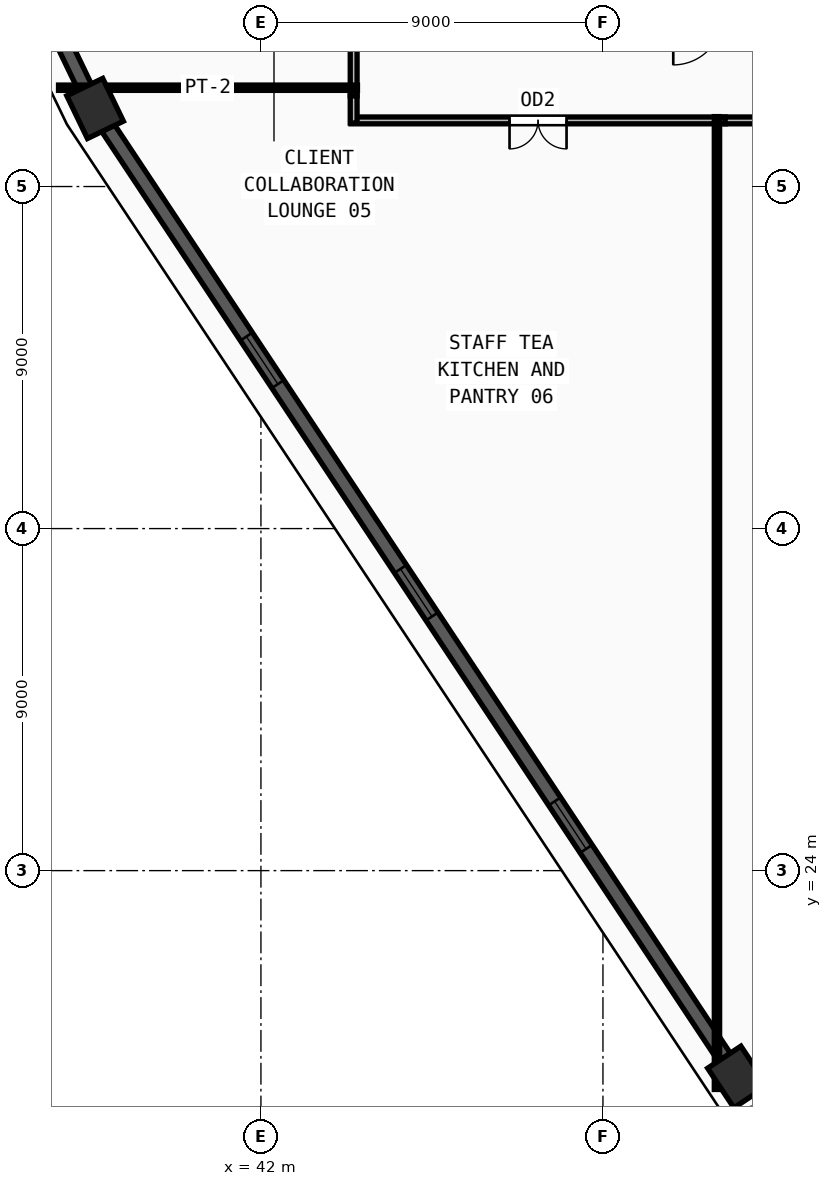
"""IFC4 building model, lengths in metres.
Left out: names, types, materials, properties, quantities, classifications, styles, units other than length and angle.
Written with IfcOpenShell. Run it as: python <this file> out.ifc"""

import sys

from ifc_helpers import new_model, si_unit, direction, frame, frame_2d, origin, origin_2d, place, context, subcontext, project, spatial, rectangle, extrude, source, transform, mapped, element, fill, save


model = new_model("IFC4")
c1 = context("Model", 3, precision=1e-05, world=origin(), true_north=direction((0.0, 1.0)))
c2 = subcontext(c1, "Body", "Model", "MODEL_VIEW")
j1 = project(units=[si_unit("LENGTHUNIT", "METRE"), si_unit("PLANEANGLEUNIT", "RADIAN")], contexts=[c1])
p1 = place(None, origin())
s1 = spatial("IfcSite", under=j1, at=p1, CompositionType="ELEMENT")
p2 = place(p1, origin())
s2 = spatial("IfcBuilding", under=s1, at=p2, CompositionType="ELEMENT")
p3 = place(p2, frame((0.0, 0.0, 213.0)))
s3 = spatial("IfcBuildingStorey", under=s2, at=p3, CompositionType="ELEMENT", Elevation=213.0)
m1 = source(origin(), c2, "Body", "SweptSolid", [
    extrude(rectangle(XDim=1.25, YDim=1.05, at=origin_2d()), origin(), (0.0, 0.0, 1.0), 3.75),
])
for number, where, z_axis, x_axis in (
    (1, (54.538, 18.57, 0.0), (0.0, 0.0, 1.0), (-0.553, 0.833, 0.0)),
    (2, (37.636, 44.054, 0.0), (0.0, 0.0, 1.0), (-0.434, 0.901, 0.0)),
):
    element("IfcColumn", number, at=place(p3, frame(where, z_axis=z_axis, x_axis=x_axis)), inside=s3, PredefinedType="COLUMN", context=c2, shape_type="MappedRepresentation", body=[
        mapped(m1, transform((0.0, 0.0, 0.0), x_axis=(1.0, 0.0, 0.0), y_axis=(0.0, 1.0, 0.0), z_axis=(0.0, 0.0, 1.0), scale=1.0)),
    ])
p4 = place(p3, frame((26.848, 66.426, 0.0), z_axis=(0.0, 0.0, 1.0), x_axis=(0.434351028037, -0.900743684099, 0.0)))
e3 = element("IfcWall", 3, at=p4, inside=s3, PredefinedType="SOLIDWALL", context=c2, shape_type="SweptSolid", body=[
    extrude(rectangle(XDim=24.222, YDim=0.38, at=frame_2d((12.111, 0.0))), origin(), (0.0, 0.0, 1.0), 3.57),
])
m2 = source(origin(), c2, "Body", "SweptSolid", [
    extrude(rectangle(XDim=1.5, YDim=1.9, at=frame_2d((0.75, 0.95))), frame((0.0, 0.2, 0.0), z_axis=(0.0, -1.0, 0.0), x_axis=(1.0, 0.0, 0.0)), (0.0, 0.0, 1.0), 0.4),
])
p5 = place(p4, frame((5.306, 0.0, 0.55)))
e4 = element("IfcOpeningElement", 4, at=p5, cuts=e3, PredefinedType="OPENING", context=c2, shape_type="MappedRepresentation", body=[
    mapped(m2, transform((0.0, 0.0, 0.0), x_axis=(1.0, 0.0, 0.0), y_axis=(0.0, 1.0, 0.0), z_axis=(0.0, 0.0, 1.0), scale=1.0)),
])
p6 = place(p4, frame((11.361, 0.0, 0.55)))
e5 = element("IfcOpeningElement", 5, at=p6, cuts=e3, PredefinedType="OPENING", context=c2, shape_type="MappedRepresentation", body=[
    mapped(m2, transform((0.0, 0.0, 0.0), x_axis=(1.0, 0.0, 0.0), y_axis=(0.0, 1.0, 0.0), z_axis=(0.0, 0.0, 1.0), scale=1.0)),
])
p7 = place(p4, frame((15.217, 0.0, 0.55)))
e6 = element("IfcOpeningElement", 6, at=p7, cuts=e3, PredefinedType="OPENING", context=c2, shape_type="MappedRepresentation", body=[
    mapped(m2, transform((0.0, 0.0, 0.0), x_axis=(1.0, 0.0, 0.0), y_axis=(0.0, 1.0, 0.0), z_axis=(0.0, 0.0, 1.0), scale=1.0)),
])
p8 = place(p3, frame((37.976, 43.541, 0.0), z_axis=(0.0, 0.0, 1.0), x_axis=(0.552730970618, -0.833359750719, 0.0)))
e7 = element("IfcWall", 7, at=p8, inside=s3, PredefinedType="SOLIDWALL", context=c2, shape_type="SweptSolid", body=[
    extrude(rectangle(XDim=29.349, YDim=0.38, at=frame_2d((14.674, 0.0))), origin(), (0.0, 0.0, 1.0), 3.57),
])
p9 = place(p8, frame((6.587, 0.0, 0.55)))
e8 = element("IfcOpeningElement", 8, at=p9, cuts=e7, PredefinedType="OPENING", context=c2, shape_type="MappedRepresentation", body=[
    mapped(m2, transform((0.0, 0.0, 0.0), x_axis=(1.0, 0.0, 0.0), y_axis=(0.0, 1.0, 0.0), z_axis=(0.0, 0.0, 1.0), scale=1.0)),
])
p10 = place(p8, frame((13.924, 0.0, 0.55)))
e9 = element("IfcOpeningElement", 9, at=p10, cuts=e7, PredefinedType="OPENING", context=c2, shape_type="MappedRepresentation", body=[
    mapped(m2, transform((0.0, 0.0, 0.0), x_axis=(1.0, 0.0, 0.0), y_axis=(0.0, 1.0, 0.0), z_axis=(0.0, 0.0, 1.0), scale=1.0)),
])
p11 = place(p8, frame((21.262, 0.0, 0.55)))
e10 = element("IfcOpeningElement", 10, at=p11, cuts=e7, PredefinedType="OPENING", context=c2, shape_type="MappedRepresentation", body=[
    mapped(m2, transform((0.0, 0.0, 0.0), x_axis=(1.0, 0.0, 0.0), y_axis=(0.0, 1.0, 0.0), z_axis=(0.0, 0.0, 1.0), scale=1.0)),
])
p12 = place(p3, frame((54.215, 43.74, 0.0), z_axis=(0.0, 0.0, 1.0), x_axis=(-1.0, 0.0, 0.0)))
e11 = element("IfcWall", 11, at=p12, inside=s3, PredefinedType="PARTITIONING", context=c2, shape_type="SweptSolid", body=[
    extrude(rectangle(XDim=9.845, YDim=0.18, at=frame_2d((4.922, 0.0))), origin(), (0.0, 0.0, 1.0), 3.57),
])
m3 = source(origin(), c2, "Body", "SweptSolid", [
    extrude(rectangle(XDim=1.5, YDim=2.2, at=frame_2d((0.75, 1.1))), frame((0.0, 0.1, 0.0), z_axis=(0.0, -1.0, 0.0), x_axis=(1.0, 0.0, 0.0)), (0.0, 0.0, 1.0), 0.2),
])
p13 = place(p12, frame((4.173, 0.0, 0.0)))
e12 = element("IfcOpeningElement", 12, at=p13, cuts=e11, PredefinedType="OPENING", context=c2, shape_type="MappedRepresentation", body=[
    mapped(m3, transform((0.0, 0.0, 0.0), x_axis=(1.0, 0.0, 0.0), y_axis=(0.0, 1.0, 0.0), z_axis=(0.0, 0.0, 1.0), scale=1.0)),
])
p14 = place(p3, frame((75.63, 43.74, 0.0), z_axis=(0.0, 0.0, 1.0), x_axis=(-1.0, 0.0, 0.0)))
e13 = element("IfcWall", 13, at=p14, inside=s3, PredefinedType="PARTITIONING", context=c2, shape_type="SweptSolid", body=[
    extrude(rectangle(XDim=21.415, YDim=0.18, at=frame_2d((10.708, 0.0))), origin(), (0.0, 0.0, 1.0), 3.57),
])
p15 = place(p14, frame((9.957, 0.0, 0.0)))
e14 = element("IfcOpeningElement", 14, at=p15, cuts=e13, PredefinedType="OPENING", context=c2, shape_type="MappedRepresentation", body=[
    mapped(m3, transform((0.0, 0.0, 0.0), x_axis=(1.0, 0.0, 0.0), y_axis=(0.0, 1.0, 0.0), z_axis=(0.0, 0.0, 1.0), scale=1.0)),
])
p16 = place(p3, frame((44.44, 44.385, 0.0), z_axis=(0.0, 0.0, 1.0), x_axis=(0.0, 1.0, 0.0)))
e15 = element("IfcWall", 15, at=p16, inside=s3, PredefinedType="PARTITIONING", context=c2, shape_type="SweptSolid", body=[
    extrude(rectangle(XDim=3.825, YDim=0.18, at=frame_2d((1.913, 0.0))), origin(), (0.0, 0.0, 1.0), 3.57),
])
p17 = place(p3, frame((44.44, 43.67, 0.0), z_axis=(0.0, 0.0, 1.0), x_axis=(0.0, 1.0, 0.0)))
e16 = element("IfcWall", 16, at=p17, inside=s3, PredefinedType="PARTITIONING", context=c2, shape_type="SweptSolid", body=[
    extrude(rectangle(XDim=0.715, YDim=0.18, at=frame_2d((0.357, 0.0))), origin(), (0.0, 0.0, 1.0), 3.57),
])
p18 = place(p3, frame((44.54, 44.6, 0.0), z_axis=(0.0, 0.0, 1.0), x_axis=(-1.0, 0.0, 0.0)))
e17 = element("IfcWall", 17, at=p18, inside=s3, PredefinedType="PARTITIONING", context=c2, shape_type="SweptSolid", body=[
    extrude(rectangle(XDim=7.866, YDim=0.14, at=frame_2d((3.933, 0.0))), origin(), (0.0, 0.0, 1.0), 3.57),
])
p19 = place(p3, frame((54.0, 43.84, 0.0), z_axis=(0.0, 0.0, 1.0), x_axis=(0.0, -1.0, 0.0)))
e18 = element("IfcWall", 18, at=p19, inside=s3, PredefinedType="PARTITIONING", context=c2, shape_type="SweptSolid", body=[
    extrude(rectangle(XDim=25.598, YDim=0.14, at=frame_2d((12.799, 0.0))), origin(), (0.0, 0.0, 1.0), 2.855),
])
m4 = source(origin(), c2, "Body", "SweptSolid", [
    extrude(rectangle(XDim=1.5, YDim=1.9, at=frame_2d((0.75, 0.95))), frame((0.0, 0.03, 0.0), z_axis=(0.0, -1.0, 0.0), x_axis=(1.0, 0.0, 0.0)), (0.0, 0.0, 1.0), 0.06),
])
p20 = place(p9, origin())
e19 = element("IfcWindow", 19, at=p20, inside=s3, PartitioningType="DOUBLE_PANEL_VERTICAL", PredefinedType="WINDOW", context=c2, shape_type="MappedRepresentation", body=[
    mapped(m4, transform((0.0, 0.0, 0.0), x_axis=(1.0, 0.0, 0.0), y_axis=(0.0, 1.0, 0.0), z_axis=(0.0, 0.0, 1.0), scale=1.0)),
])
fill(e8, e19)
p21 = place(p10, origin())
e20 = element("IfcWindow", 20, at=p21, inside=s3, PartitioningType="DOUBLE_PANEL_VERTICAL", PredefinedType="WINDOW", context=c2, shape_type="MappedRepresentation", body=[
    mapped(m4, transform((0.0, 0.0, 0.0), x_axis=(1.0, 0.0, 0.0), y_axis=(0.0, 1.0, 0.0), z_axis=(0.0, 0.0, 1.0), scale=1.0)),
])
fill(e9, e20)
p22 = place(p11, origin())
e21 = element("IfcWindow", 21, at=p22, inside=s3, PartitioningType="DOUBLE_PANEL_VERTICAL", PredefinedType="WINDOW", context=c2, shape_type="MappedRepresentation", body=[
    mapped(m4, transform((0.0, 0.0, 0.0), x_axis=(1.0, 0.0, 0.0), y_axis=(0.0, 1.0, 0.0), z_axis=(0.0, 0.0, 1.0), scale=1.0)),
])
fill(e10, e21)
m5 = source(origin(), c2, "Body", "SweptSolid", [
    extrude(rectangle(XDim=1.5, YDim=2.2, at=frame_2d((0.75, 1.1))), frame((0.0, 0.025, 0.0), z_axis=(0.0, -1.0, 0.0), x_axis=(1.0, 0.0, 0.0)), (0.0, 0.0, 1.0), 0.05),
])
p23 = place(p13, origin())
e22 = element("IfcDoor", 22, at=p23, inside=s3, OperationType="DOUBLE_DOOR_SINGLE_SWING", PredefinedType="DOOR", context=c2, shape_type="MappedRepresentation", body=[
    mapped(m5, transform((0.0, 0.0, 0.0), x_axis=(1.0, 0.0, 0.0), y_axis=(0.0, 1.0, 0.0), z_axis=(0.0, 0.0, 1.0), scale=1.0)),
])
fill(e12, e22)
save(model, sys.argv[1])
